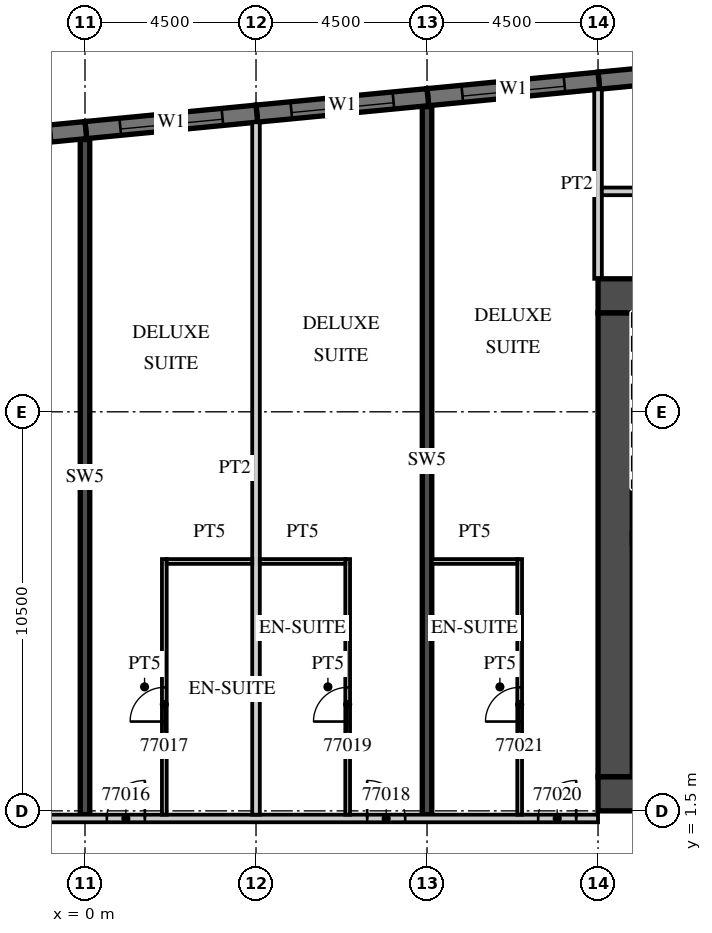
"""IFC4 building model, lengths in metres.
Left out: names, types, materials, properties, quantities, classifications, styles, units other than length and angle.
Written with IfcOpenShell. Run it as: python <this file> out.ifc"""

import sys

from ifc_helpers import new_model, si_unit, direction, frame, frame_2d, origin, place, context, subcontext, project, spatial, rectangle, extrude, element, fill, save


model = new_model("IFC4")
c1 = context("Model", 3, precision=1e-05, world=origin(), true_north=direction((0.0, 1.0)))
c2 = subcontext(c1, "Body", "Model", "MODEL_VIEW")
j1 = project(units=[si_unit("LENGTHUNIT", "METRE"), si_unit("PLANEANGLEUNIT", "RADIAN")], contexts=[c1])
p1 = place(None, origin())
s1 = spatial("IfcSite", under=j1, at=p1, CompositionType="ELEMENT")
p2 = place(p1, origin())
s2 = spatial("IfcBuilding", under=s1, at=p2, CompositionType="ELEMENT")
p3 = place(p2, frame((0.0, 0.0, 304.8)))
s3 = spatial("IfcBuildingStorey", under=s2, at=p3, CompositionType="ELEMENT", Elevation=304.8)
p4 = place(p3, frame((0.0, 1.4, 0.0), z_axis=(0.0, 0.0, 1.0), x_axis=(0.0, 1.0, 0.0)))
e1 = element("IfcWall", 1, at=p4, inside=s3, PredefinedType="SHEAR", context=c2, shape_type="SweptSolid", body=[
    extrude(rectangle(XDim=17.763, YDim=0.25, at=frame_2d((8.881, 0.0))), origin(), (0.0, 0.0, 1.0), 3.3),
])
p5 = place(p3, frame((9.0, 1.4, 0.0), z_axis=(0.0, 0.0, 1.0), x_axis=(0.0, 1.0, 0.0)))
e2 = element("IfcWall", 2, at=p5, inside=s3, PredefinedType="SHEAR", context=c2, shape_type="SweptSolid", body=[
    extrude(rectangle(XDim=18.629, YDim=0.25, at=frame_2d((9.315, 0.0))), origin(), (0.0, 0.0, 1.0), 3.3),
])
p6 = place(p3, frame((30.946, 22.391, 0.0), z_axis=(0.0, 0.0, 1.0), x_axis=(-0.995396397117, -0.095843688398, 0.0)))
e3 = element("IfcWall", 3, at=p6, inside=s3, PredefinedType="SOLIDWALL", context=c2, shape_type="SweptSolid", body=[
    extrude(rectangle(XDim=17.505, YDim=0.45, at=frame_2d((8.752, 0.0))), origin(), (0.0, 0.0, 1.0), 2.9),
])
p7 = place(p3, frame((13.521, 20.713, 0.0), z_axis=(0.0, 0.0, 1.0), x_axis=(-0.995395166513, -0.095856468129, 0.0)))
e4 = element("IfcWall", 4, at=p7, inside=s3, PredefinedType="SOLIDWALL", context=c2, shape_type="SweptSolid", body=[
    extrude(rectangle(XDim=4.521, YDim=0.45, at=frame_2d((2.26, 0.0))), origin(), (0.0, 0.0, 1.0), 2.9),
])
p8 = place(p7, frame((0.91, 0.0, 0.45)))
e5 = element("IfcOpeningElement", 5, at=p8, cuts=e4, PredefinedType="OPENING", context=c2, shape_type="SweptSolid", body=[
    extrude(rectangle(XDim=2.7, YDim=2.25, at=frame_2d((1.35, 1.125))), frame((0.0, 0.235, 0.0), z_axis=(0.0, -1.0, 0.0), x_axis=(1.0, 0.0, 0.0)), (0.0, 0.0, 1.0), 0.47),
])
p9 = place(p3, frame((9.021, 20.28, 0.0), z_axis=(0.0, 0.0, 1.0), x_axis=(-0.995395166513, -0.095856468129, 0.0)))
e6 = element("IfcWall", 6, at=p9, inside=s3, PredefinedType="SOLIDWALL", context=c2, shape_type="SweptSolid", body=[
    extrude(rectangle(XDim=4.521, YDim=0.45, at=frame_2d((2.26, 0.0))), origin(), (0.0, 0.0, 1.0), 2.9),
])
p10 = place(p9, frame((0.91, 0.0, 0.45)))
e7 = element("IfcOpeningElement", 7, at=p10, cuts=e6, PredefinedType="OPENING", context=c2, shape_type="SweptSolid", body=[
    extrude(rectangle(XDim=2.7, YDim=2.25, at=frame_2d((1.35, 1.125))), frame((0.0, 0.235, 0.0), z_axis=(0.0, -1.0, 0.0), x_axis=(1.0, 0.0, 0.0)), (0.0, 0.0, 1.0), 0.47),
])
p11 = place(p3, frame((4.521, 19.846, 0.0), z_axis=(0.0, 0.0, 1.0), x_axis=(-0.995394670263, -0.095861621166, 0.0)))
e8 = element("IfcWall", 8, at=p11, inside=s3, PredefinedType="SOLIDWALL", context=c2, shape_type="SweptSolid", body=[
    extrude(rectangle(XDim=4.521, YDim=0.45, at=frame_2d((2.26, 0.0))), origin(), (0.0, 0.0, 1.0), 2.9),
])
p12 = place(p11, frame((0.91, 0.0, 0.45)))
e9 = element("IfcOpeningElement", 9, at=p12, cuts=e8, PredefinedType="OPENING", context=c2, shape_type="SweptSolid", body=[
    extrude(rectangle(XDim=2.7, YDim=2.25, at=frame_2d((1.35, 1.125))), frame((0.0, 0.235, 0.0), z_axis=(0.0, -1.0, 0.0), x_axis=(1.0, 0.0, 0.0)), (0.0, 0.0, 1.0), 0.47),
])
p13 = place(p3, frame((0.022, 19.413, 0.0), z_axis=(0.0, 0.0, 1.0), x_axis=(-0.995400317863, -0.09580296028, 0.0)))
e10 = element("IfcWall", 10, at=p13, inside=s3, PredefinedType="SOLIDWALL", context=c2, shape_type="SweptSolid", body=[
    extrude(rectangle(XDim=4.521, YDim=0.45, at=frame_2d((2.26, 0.0))), origin(), (0.0, 0.0, 1.0), 2.9),
])
p14 = place(p13, frame((0.91, 0.0, 0.45)))
e11 = element("IfcOpeningElement", 11, at=p14, cuts=e10, PredefinedType="OPENING", context=c2, shape_type="SweptSolid", body=[
    extrude(rectangle(XDim=2.7, YDim=2.25, at=frame_2d((1.35, 1.125))), frame((0.0, 0.235, 0.0), z_axis=(0.0, -1.0, 0.0), x_axis=(1.0, 0.0, 0.0)), (0.0, 0.0, 1.0), 0.47),
])
p15 = place(p3, frame((13.5, 15.5, 0.0), z_axis=(0.0, 0.0, 1.0), x_axis=(0.0, 1.0, 0.0)))
e12 = element("IfcWall", 12, at=p15, inside=s3, PredefinedType="PARTITIONING", context=c2, shape_type="SweptSolid", body=[
    extrude(rectangle(XDim=4.985, YDim=0.2, at=frame_2d((2.493, 0.0))), origin(), (0.0, 0.0, 1.0), 2.9),
])
p16 = place(p3, frame((-39.909, 1.3, 0.0), z_axis=(0.0, 0.0, 1.0), x_axis=(1.0, 0.0, 0.0)))
e13 = element("IfcWall", 13, at=p16, inside=s3, PredefinedType="PARTITIONING", context=c2, shape_type="SweptSolid", body=[
    extrude(rectangle(XDim=53.409, YDim=0.2, at=frame_2d((26.705, 0.0))), origin(), (0.0, 0.0, 1.0), 2.9),
])
p17 = place(p16, frame((0.15, 0.0, 0.0)))
e14 = element("IfcOpeningElement", 14, at=p17, cuts=e13, PredefinedType="OPENING", context=c2, shape_type="SweptSolid", body=[
    extrude(rectangle(XDim=0.9, YDim=2.1, at=frame_2d((0.45, 1.05))), frame((0.0, 0.11, 0.0), z_axis=(0.0, -1.0, 0.0), x_axis=(1.0, 0.0, 0.0)), (0.0, 0.0, 1.0), 0.22),
])
p18 = place(p16, frame((9.271, 0.0, 0.0)))
e15 = element("IfcOpeningElement", 15, at=p18, cuts=e13, PredefinedType="OPENING", context=c2, shape_type="SweptSolid", body=[
    extrude(rectangle(XDim=1.2, YDim=2.1, at=frame_2d((0.6, 1.05))), frame((0.0, 0.11, 0.0), z_axis=(0.0, -1.0, 0.0), x_axis=(1.0, 0.0, 0.0)), (0.0, 0.0, 1.0), 0.22),
])
p19 = place(p16, frame((13.484, 0.0, 0.0)))
e16 = element("IfcOpeningElement", 16, at=p19, cuts=e13, PredefinedType="OPENING", context=c2, shape_type="SweptSolid", body=[
    extrude(rectangle(XDim=1.0, YDim=2.1, at=frame_2d((0.5, 1.05))), frame((0.0, 0.11, 0.0), z_axis=(0.0, -1.0, 0.0), x_axis=(1.0, 0.0, 0.0)), (0.0, 0.0, 1.0), 0.22),
])
p20 = place(p16, frame((17.959, 0.0, 0.0)))
e17 = element("IfcOpeningElement", 17, at=p20, cuts=e13, PredefinedType="OPENING", context=c2, shape_type="SweptSolid", body=[
    extrude(rectangle(XDim=1.0, YDim=2.1, at=frame_2d((0.5, 1.05))), frame((0.0, 0.11, 0.0), z_axis=(0.0, -1.0, 0.0), x_axis=(1.0, 0.0, 0.0)), (0.0, 0.0, 1.0), 0.22),
])
p21 = place(p16, frame((24.859, 0.0, 0.0)))
e18 = element("IfcOpeningElement", 18, at=p21, cuts=e13, PredefinedType="OPENING", context=c2, shape_type="SweptSolid", body=[
    extrude(rectangle(XDim=1.0, YDim=2.1, at=frame_2d((0.5, 1.05))), frame((0.0, 0.11, 0.0), z_axis=(0.0, -1.0, 0.0), x_axis=(1.0, 0.0, 0.0)), (0.0, 0.0, 1.0), 0.22),
])
p22 = place(p16, frame((29.334, 0.0, 0.0)))
e19 = element("IfcOpeningElement", 19, at=p22, cuts=e13, PredefinedType="OPENING", context=c2, shape_type="SweptSolid", body=[
    extrude(rectangle(XDim=1.0, YDim=2.1, at=frame_2d((0.5, 1.05))), frame((0.0, 0.11, 0.0), z_axis=(0.0, -1.0, 0.0), x_axis=(1.0, 0.0, 0.0)), (0.0, 0.0, 1.0), 0.22),
])
p23 = place(p16, frame((36.271, 0.0, 0.0)))
e20 = element("IfcOpeningElement", 20, at=p23, cuts=e13, PredefinedType="OPENING", context=c2, shape_type="SweptSolid", body=[
    extrude(rectangle(XDim=1.2, YDim=2.1, at=frame_2d((0.6, 1.05))), frame((0.0, 0.11, 0.0), z_axis=(0.0, -1.0, 0.0), x_axis=(1.0, 0.0, 0.0)), (0.0, 0.0, 1.0), 0.22),
])
p24 = place(p16, frame((40.484, 0.0, 0.0)))
e21 = element("IfcOpeningElement", 21, at=p24, cuts=e13, PredefinedType="OPENING", context=c2, shape_type="SweptSolid", body=[
    extrude(rectangle(XDim=1.0, YDim=2.1, at=frame_2d((0.5, 1.05))), frame((0.0, 0.11, 0.0), z_axis=(0.0, -1.0, 0.0), x_axis=(1.0, 0.0, 0.0)), (0.0, 0.0, 1.0), 0.22),
])
p25 = place(p16, frame((47.334, 0.0, 0.0)))
e22 = element("IfcOpeningElement", 22, at=p25, cuts=e13, PredefinedType="OPENING", context=c2, shape_type="SweptSolid", body=[
    extrude(rectangle(XDim=1.0, YDim=2.1, at=frame_2d((0.5, 1.05))), frame((0.0, 0.11, 0.0), z_axis=(0.0, -1.0, 0.0), x_axis=(1.0, 0.0, 0.0)), (0.0, 0.0, 1.0), 0.22),
])
p26 = place(p16, frame((51.834, 0.0, 0.0)))
e23 = element("IfcOpeningElement", 23, at=p26, cuts=e13, PredefinedType="OPENING", context=c2, shape_type="SweptSolid", body=[
    extrude(rectangle(XDim=1.0, YDim=2.1, at=frame_2d((0.5, 1.05))), frame((0.0, 0.11, 0.0), z_axis=(0.0, -1.0, 0.0), x_axis=(1.0, 0.0, 0.0)), (0.0, 0.0, 1.0), 0.22),
])
p27 = place(p3, frame((4.5, 1.4, 0.0), z_axis=(0.0, 0.0, 1.0), x_axis=(0.0, 1.0, 0.0)))
e24 = element("IfcWall", 24, at=p27, inside=s3, PredefinedType="PARTITIONING", context=c2, shape_type="SweptSolid", body=[
    extrude(rectangle(XDim=18.218, YDim=0.2, at=frame_2d((9.109, 0.0))), origin(), (0.0, 0.0, 1.0), 2.9),
])
p28 = place(p3, frame((2.087, 1.4, 0.0), z_axis=(0.0, 0.0, 1.0), x_axis=(0.0, 1.0, 0.0)))
e25 = element("IfcWall", 25, at=p28, inside=s3, PredefinedType="PARTITIONING", context=c2, shape_type="SweptSolid", body=[
    extrude(rectangle(XDim=6.725, YDim=0.125, at=frame_2d((3.363, 0.0))), origin(), (0.0, 0.0, 1.0), 2.9),
])
p29 = place(p28, frame((2.45, 0.0, 0.0)))
e26 = element("IfcOpeningElement", 26, at=p29, cuts=e25, PredefinedType="OPENING", context=c2, shape_type="SweptSolid", body=[
    extrude(rectangle(XDim=0.9, YDim=2.1, at=frame_2d((0.45, 1.05))), frame((0.0, 0.073, 0.0), z_axis=(0.0, -1.0, 0.0), x_axis=(1.0, 0.0, 0.0)), (0.0, 0.0, 1.0), 0.145),
])
p30 = place(p3, frame((2.15, 8.062, 0.0), z_axis=(0.0, 0.0, 1.0), x_axis=(1.0, 0.0, 0.0)))
e27 = element("IfcWall", 27, at=p30, inside=s3, PredefinedType="PARTITIONING", context=c2, shape_type="SweptSolid", body=[
    extrude(rectangle(XDim=2.25, YDim=0.125, at=frame_2d((1.125, 0.0))), origin(), (0.0, 0.0, 1.0), 2.9),
])
p31 = place(p3, frame((6.912, 1.4, 0.0), z_axis=(0.0, 0.0, 1.0), x_axis=(0.0, 1.0, 0.0)))
e28 = element("IfcWall", 28, at=p31, inside=s3, PredefinedType="PARTITIONING", context=c2, shape_type="SweptSolid", body=[
    extrude(rectangle(XDim=6.725, YDim=0.125, at=frame_2d((3.363, 0.0))), origin(), (0.0, 0.0, 1.0), 2.9),
])
p32 = place(p31, frame((2.45, 0.0, 0.0)))
e29 = element("IfcOpeningElement", 29, at=p32, cuts=e28, PredefinedType="OPENING", context=c2, shape_type="SweptSolid", body=[
    extrude(rectangle(XDim=0.9, YDim=2.1, at=frame_2d((0.45, 1.05))), frame((0.0, 0.073, 0.0), z_axis=(0.0, -1.0, 0.0), x_axis=(1.0, 0.0, 0.0)), (0.0, 0.0, 1.0), 0.145),
])
p33 = place(p3, frame((4.6, 8.062, 0.0), z_axis=(0.0, 0.0, 1.0), x_axis=(1.0, 0.0, 0.0)))
e30 = element("IfcWall", 30, at=p33, inside=s3, PredefinedType="PARTITIONING", context=c2, shape_type="SweptSolid", body=[
    extrude(rectangle(XDim=2.25, YDim=0.125, at=frame_2d((1.125, 0.0))), origin(), (0.0, 0.0, 1.0), 2.9),
])
p34 = place(p3, frame((11.438, 1.4, 0.0), z_axis=(0.0, 0.0, 1.0), x_axis=(0.0, 1.0, 0.0)))
e31 = element("IfcWall", 31, at=p34, inside=s3, PredefinedType="PARTITIONING", context=c2, shape_type="SweptSolid", body=[
    extrude(rectangle(XDim=6.725, YDim=0.125, at=frame_2d((3.363, 0.0))), origin(), (0.0, 0.0, 1.0), 2.9),
])
p35 = place(p34, frame((2.45, 0.0, 0.0)))
e32 = element("IfcOpeningElement", 32, at=p35, cuts=e31, PredefinedType="OPENING", context=c2, shape_type="SweptSolid", body=[
    extrude(rectangle(XDim=0.9, YDim=2.1, at=frame_2d((0.45, 1.05))), frame((0.0, 0.073, 0.0), z_axis=(0.0, -1.0, 0.0), x_axis=(1.0, 0.0, 0.0)), (0.0, 0.0, 1.0), 0.145),
])
p36 = place(p3, frame((9.125, 8.062, 0.0), z_axis=(0.0, 0.0, 1.0), x_axis=(1.0, 0.0, 0.0)))
e33 = element("IfcWall", 33, at=p36, inside=s3, PredefinedType="PARTITIONING", context=c2, shape_type="SweptSolid", body=[
    extrude(rectangle(XDim=2.25, YDim=0.125, at=frame_2d((1.125, 0.0))), origin(), (0.0, 0.0, 1.0), 2.9),
])
p37 = place(p3, frame((13.5, 1.95, 0.0), z_axis=(0.0, 0.0, 1.0), x_axis=(1.0, 0.0, 0.0)))
e34 = element("IfcWall", 34, at=p37, inside=s3, PredefinedType="SHEAR", context=c2, shape_type="SweptSolid", body=[
    extrude(rectangle(XDim=18.0, YDim=0.9, at=frame_2d((9.0, 0.0))), origin(), (0.0, 0.0, 1.0), 2.9),
])
p38 = place(p37, frame((1.475, 0.0, 0.0)))
e35 = element("IfcOpeningElement", 35, at=p38, cuts=e34, PredefinedType="OPENING", context=c2, shape_type="SweptSolid", body=[
    extrude(rectangle(XDim=1.8, YDim=2.1, at=frame_2d((0.9, 1.05))), frame((0.0, 0.46, 0.0), z_axis=(0.0, -1.0, 0.0), x_axis=(1.0, 0.0, 0.0)), (0.0, 0.0, 1.0), 0.92),
])
p39 = place(p3, frame((13.5, 15.05, 0.0), z_axis=(0.0, 0.0, 1.0), x_axis=(1.0, 0.0, 0.0)))
e36 = element("IfcWall", 36, at=p39, inside=s3, PredefinedType="SHEAR", context=c2, shape_type="SweptSolid", body=[
    extrude(rectangle(XDim=6.8, YDim=0.9, at=frame_2d((3.4, 0.0))), origin(), (0.0, 0.0, 1.0), 2.9),
])
p40 = place(p39, frame((4.725, 0.0, 0.0)))
e37 = element("IfcOpeningElement", 37, at=p40, cuts=e36, PredefinedType="OPENING", context=c2, shape_type="SweptSolid", body=[
    extrude(rectangle(XDim=1.2, YDim=2.1, at=frame_2d((0.6, 1.05))), frame((0.0, 0.46, 0.0), z_axis=(0.0, -1.0, 0.0), x_axis=(1.0, 0.0, 0.0)), (0.0, 0.0, 1.0), 0.92),
])
p41 = place(p3, frame((13.95, 2.4, 0.0), z_axis=(0.0, 0.0, 1.0), x_axis=(0.0, 1.0, 0.0)))
e38 = element("IfcWall", 38, at=p41, inside=s3, PredefinedType="SHEAR", context=c2, shape_type="SweptSolid", body=[
    extrude(rectangle(XDim=12.2, YDim=0.9, at=frame_2d((6.1, 0.0))), origin(), (0.0, 0.0, 1.0), 2.9),
])
p42 = place(p3, frame((13.6, 17.8, 0.0), z_axis=(0.0, 0.0, 1.0), x_axis=(1.0, 0.0, 0.0)))
e39 = element("IfcWall", 39, at=p42, inside=s3, PredefinedType="PARTITIONING", context=c2, shape_type="SweptSolid", body=[
    extrude(rectangle(XDim=21.354, YDim=0.2, at=frame_2d((10.677, 0.0))), origin(), (0.0, 0.0, 1.0), 2.9),
])
p43 = place(p42, frame((17.812, 0.0, 0.0)))
e40 = element("IfcOpeningElement", 40, at=p43, cuts=e39, PredefinedType="OPENING", context=c2, shape_type="SweptSolid", body=[
    extrude(rectangle(XDim=0.9, YDim=2.1, at=frame_2d((0.45, 1.05))), frame((0.0, 0.11, 0.0), z_axis=(0.0, -1.0, 0.0), x_axis=(1.0, 0.0, 0.0)), (0.0, 0.0, 1.0), 0.22),
])
p44 = place(p42, frame((9.512, 0.0, 0.0)))
e41 = element("IfcOpeningElement", 41, at=p44, cuts=e39, PredefinedType="OPENING", context=c2, shape_type="SweptSolid", body=[
    extrude(rectangle(XDim=0.9, YDim=2.1, at=frame_2d((0.45, 1.05))), frame((0.0, 0.11, 0.0), z_axis=(0.0, -1.0, 0.0), x_axis=(1.0, 0.0, 0.0)), (0.0, 0.0, 1.0), 0.22),
])
p45 = place(p8, origin())
e42 = element("IfcWindow", 42, at=p45, inside=s3, PartitioningType="SINGLE_PANEL", PredefinedType="WINDOW", context=c2, shape_type="SweptSolid", body=[
    extrude(rectangle(XDim=2.7, YDim=2.25, at=frame_2d((1.35, 1.125))), frame((0.0, 0.09, 0.0), z_axis=(0.0, -1.0, 0.0), x_axis=(1.0, 0.0, 0.0)), (0.0, 0.0, 1.0), 0.06),
])
fill(e5, e42)
p46 = place(p10, origin())
e43 = element("IfcWindow", 43, at=p46, inside=s3, PartitioningType="SINGLE_PANEL", PredefinedType="WINDOW", context=c2, shape_type="SweptSolid", body=[
    extrude(rectangle(XDim=2.7, YDim=2.25, at=frame_2d((1.35, 1.125))), frame((0.0, 0.09, 0.0), z_axis=(0.0, -1.0, 0.0), x_axis=(1.0, 0.0, 0.0)), (0.0, 0.0, 1.0), 0.06),
])
fill(e7, e43)
p47 = place(p12, origin())
e44 = element("IfcWindow", 44, at=p47, inside=s3, PartitioningType="SINGLE_PANEL", PredefinedType="WINDOW", context=c2, shape_type="SweptSolid", body=[
    extrude(rectangle(XDim=2.7, YDim=2.25, at=frame_2d((1.35, 1.125))), frame((0.0, 0.09, 0.0), z_axis=(0.0, -1.0, 0.0), x_axis=(1.0, 0.0, 0.0)), (0.0, 0.0, 1.0), 0.06),
])
fill(e9, e44)
p48 = place(p24, origin())
e45 = element("IfcDoor", 45, at=p48, inside=s3, OperationType="SINGLE_SWING_RIGHT", PredefinedType="DOOR", context=c2, shape_type="SweptSolid", body=[
    extrude(rectangle(XDim=1.0, YDim=2.1, at=frame_2d((0.5, 1.05))), frame((0.0, 0.025, 0.0), z_axis=(0.0, -1.0, 0.0), x_axis=(1.0, 0.0, 0.0)), (0.0, 0.0, 1.0), 0.05),
])
fill(e21, e45)
p49 = place(p29, origin())
e46 = element("IfcDoor", 46, at=p49, inside=s3, OperationType="SINGLE_SWING_LEFT", PredefinedType="DOOR", context=c2, shape_type="SweptSolid", body=[
    extrude(rectangle(XDim=0.9, YDim=2.1, at=frame_2d((0.45, 1.05))), frame((0.0, 0.025, 0.0), z_axis=(0.0, -1.0, 0.0), x_axis=(1.0, 0.0, 0.0)), (0.0, 0.0, 1.0), 0.05),
])
fill(e26, e46)
p50 = place(p25, origin())
e47 = element("IfcDoor", 47, at=p50, inside=s3, OperationType="SINGLE_SWING_LEFT", PredefinedType="DOOR", context=c2, shape_type="SweptSolid", body=[
    extrude(rectangle(XDim=1.0, YDim=2.1, at=frame_2d((0.5, 1.05))), frame((0.0, 0.025, 0.0), z_axis=(0.0, -1.0, 0.0), x_axis=(1.0, 0.0, 0.0)), (0.0, 0.0, 1.0), 0.05),
])
fill(e22, e47)
p51 = place(p32, origin())
e48 = element("IfcDoor", 48, at=p51, inside=s3, OperationType="SINGLE_SWING_LEFT", PredefinedType="DOOR", context=c2, shape_type="SweptSolid", body=[
    extrude(rectangle(XDim=0.9, YDim=2.1, at=frame_2d((0.45, 1.05))), frame((0.0, 0.025, 0.0), z_axis=(0.0, -1.0, 0.0), x_axis=(1.0, 0.0, 0.0)), (0.0, 0.0, 1.0), 0.05),
])
fill(e29, e48)
p52 = place(p26, origin())
e49 = element("IfcDoor", 49, at=p52, inside=s3, OperationType="SINGLE_SWING_RIGHT", PredefinedType="DOOR", context=c2, shape_type="SweptSolid", body=[
    extrude(rectangle(XDim=1.0, YDim=2.1, at=frame_2d((0.5, 1.05))), frame((0.0, 0.025, 0.0), z_axis=(0.0, -1.0, 0.0), x_axis=(1.0, 0.0, 0.0)), (0.0, 0.0, 1.0), 0.05),
])
fill(e23, e49)
p53 = place(p35, origin())
e50 = element("IfcDoor", 50, at=p53, inside=s3, OperationType="SINGLE_SWING_LEFT", PredefinedType="DOOR", context=c2, shape_type="SweptSolid", body=[
    extrude(rectangle(XDim=0.9, YDim=2.1, at=frame_2d((0.45, 1.05))), frame((0.0, 0.025, 0.0), z_axis=(0.0, -1.0, 0.0), x_axis=(1.0, 0.0, 0.0)), (0.0, 0.0, 1.0), 0.05),
])
fill(e32, e50)
save(model, sys.argv[1])
